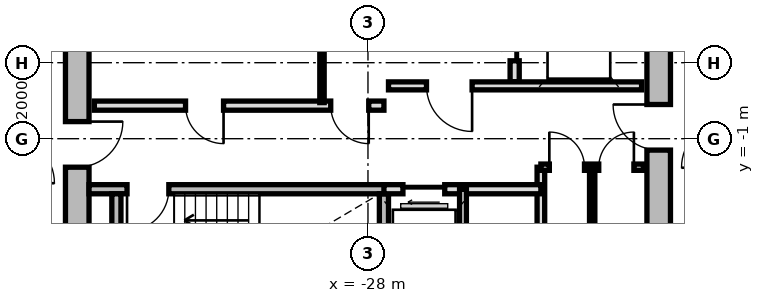
"""IFC4 building model, lengths in metres.
Left out: names, types, materials, properties, quantities, classifications, styles, units other than length and angle.
Written with IfcOpenShell. Run it as: python <this file> out.ifc"""

import sys

from ifc_helpers import new_model, si_unit, direction, frame, frame_2d, origin, place, context, subcontext, project, spatial, rectangle, extrude, source, transform, mapped, element, fill, save


model = new_model("IFC4")
c1 = context("Model", 3, precision=1e-05, world=origin(), true_north=direction((0.0, 1.0)))
c2 = subcontext(c1, "Body", "Model", "MODEL_VIEW")
j1 = project(units=[si_unit("LENGTHUNIT", "METRE"), si_unit("PLANEANGLEUNIT", "RADIAN")], contexts=[c1])
p1 = place(None, origin())
s1 = spatial("IfcSite", under=j1, at=p1, CompositionType="ELEMENT")
p2 = place(p1, origin())
s2 = spatial("IfcBuilding", under=s1, at=p2, CompositionType="ELEMENT")
p3 = place(p2, frame((0.0, 0.0, 143.45)))
s3 = spatial("IfcBuildingStorey", under=s2, at=p3, CompositionType="ELEMENT", Elevation=143.45)
m1 = source(origin(), c2, "Body", "SweptSolid", [
    extrude(rectangle(XDim=11.1, YDim=0.62, at=frame_2d((5.55, 0.0))), origin(), (0.0, 0.0, 1.0), 2.81),
])
p4 = place(p3, frame((-35.65, -5.55, 0.0), z_axis=(0.0, 0.0, 1.0), x_axis=(0.0, 1.0, 0.0)))
e1 = element("IfcWall", 1, at=p4, inside=s3, PredefinedType="SHEAR", context=c2, shape_type="MappedRepresentation", body=[
    mapped(m1, transform((0.0, 0.0, 0.0), x_axis=(1.0, 0.0, 0.0), y_axis=(0.0, 1.0, 0.0), z_axis=(0.0, 0.0, 1.0), scale=1.0)),
])
p5 = place(p4, frame((3.8, 0.0, 0.0)))
e2 = element("IfcOpeningElement", 2, at=p5, cuts=e1, PredefinedType="OPENING", context=c2, shape_type="SweptSolid", body=[
    extrude(rectangle(XDim=1.2, YDim=2.15, at=frame_2d((0.6, 1.075))), frame((0.0, 0.32, 0.0), z_axis=(0.0, -1.0, 0.0), x_axis=(1.0, 0.0, 0.0)), (0.0, 0.0, 1.0), 0.64),
])
p6 = place(p3, frame((-20.35, 5.55, 0.0), z_axis=(0.0, 0.0, 1.0), x_axis=(0.0, -1.0, 0.0)))
e3 = element("IfcWall", 3, at=p6, inside=s3, PredefinedType="SHEAR", context=c2, shape_type="MappedRepresentation", body=[
    mapped(m1, transform((0.0, 0.0, 0.0), x_axis=(1.0, 0.0, 0.0), y_axis=(0.0, 1.0, 0.0), z_axis=(0.0, 0.0, 1.0), scale=1.0)),
])
p7 = place(p6, frame((5.65, 0.0, 0.0)))
e4 = element("IfcOpeningElement", 4, at=p7, cuts=e3, PredefinedType="OPENING", context=c2, shape_type="SweptSolid", body=[
    extrude(rectangle(XDim=1.2, YDim=2.15, at=frame_2d((0.6, 1.075))), frame((0.0, 0.32, 0.0), z_axis=(0.0, -1.0, 0.0), x_axis=(1.0, 0.0, 0.0)), (0.0, 0.0, 1.0), 0.64),
])
m2 = source(origin(), c2, "Body", "SweptSolid", [
    extrude(rectangle(XDim=7.88, YDim=0.24, at=frame_2d((3.94, 0.0))), origin(), (0.0, 0.0, 1.0), 2.81),
])
p8 = place(p3, frame((-35.34, -2.33, 0.0), z_axis=(0.0, 0.0, 1.0), x_axis=(1.0, 0.0, 0.0)))
e5 = element("IfcWall", 5, at=p8, inside=s3, PredefinedType="PARTITIONING", context=c2, shape_type="MappedRepresentation", body=[
    mapped(m2, transform((0.0, 0.0, 0.0), x_axis=(1.0, 0.0, 0.0), y_axis=(0.0, 1.0, 0.0), z_axis=(0.0, 0.0, 1.0), scale=1.0)),
])
p9 = place(p8, frame((1.0, 0.0, 0.0)))
e6 = element("IfcOpeningElement", 6, at=p9, cuts=e5, PredefinedType="OPENING", context=c2, shape_type="SweptSolid", body=[
    extrude(rectangle(XDim=1.1, YDim=2.15, at=frame_2d((0.55, 1.075))), frame((0.0, 0.13, 0.0), z_axis=(0.0, -1.0, 0.0), x_axis=(1.0, 0.0, 0.0)), (0.0, 0.0, 1.0), 0.26),
])
m3 = source(origin(), c2, "Body", "SweptSolid", [
    extrude(rectangle(XDim=3.19, YDim=0.24, at=frame_2d((1.595, 0.0))), origin(), (0.0, 0.0, 1.0), 2.81),
])
for number, where, z_axis, x_axis in (
    (7, (-34.62, -5.64, 0.0), (0.0, 0.0, 1.0), (0.0, 1.0, 0.0)),
    (8, (-27.58, -5.64, 0.0), (0.0, 0.0, 1.0), (0.0, 1.0, 0.0)),
):
    element("IfcWall", number, at=place(p3, frame(where, z_axis=z_axis, x_axis=x_axis)), inside=s3, PredefinedType="PARTITIONING", context=c2, shape_type="MappedRepresentation", body=[
        mapped(m3, transform((0.0, 0.0, 0.0), x_axis=(1.0, 0.0, 0.0), y_axis=(0.0, 1.0, 0.0), z_axis=(0.0, 0.0, 1.0), scale=1.0)),
    ])
m4 = source(origin(), c2, "Body", "SweptSolid", [
    extrude(rectangle(XDim=5.0, YDim=0.24, at=frame_2d((2.5, 0.0))), origin(), (0.0, 0.0, 1.0), 2.795),
])
p10 = place(p3, frame((-24.14, 0.5, 0.0), z_axis=(0.0, 0.0, 1.0), x_axis=(0.0, 1.0, 0.0)))
e9 = element("IfcWall", 9, at=p10, inside=s3, PredefinedType="PARTITIONING", context=c2, shape_type="MappedRepresentation", body=[
    mapped(m4, transform((0.0, 0.0, 0.0), x_axis=(1.0, 0.0, 0.0), y_axis=(0.0, 1.0, 0.0), z_axis=(0.0, 0.0, 1.0), scale=1.0)),
])
p11 = place(p10, frame((3.05, 0.0, 0.0)))
e10 = element("IfcOpeningElement", 10, at=p11, cuts=e9, PredefinedType="OPENING", context=c2, shape_type="SweptSolid", body=[
    extrude(rectangle(XDim=1.3, YDim=2.2, at=frame_2d((0.65, 1.1))), frame((0.0, 0.13, 0.0), z_axis=(0.0, -1.0, 0.0), x_axis=(1.0, 0.0, 0.0)), (0.0, 0.0, 1.0), 0.26),
])
p12 = place(p10, frame((0.55, 0.0, 0.0)))
e11 = element("IfcOpeningElement", 11, at=p12, cuts=e9, PredefinedType="OPENING", context=c2, shape_type="SweptSolid", body=[
    extrude(rectangle(XDim=1.3, YDim=2.2, at=frame_2d((0.65, 1.1))), frame((0.0, 0.13, 0.0), z_axis=(0.0, -1.0, 0.0), x_axis=(1.0, 0.0, 0.0)), (0.0, 0.0, 1.0), 0.26),
])
m5 = source(origin(), c2, "Body", "SweptSolid", [
    extrude(rectangle(XDim=6.66, YDim=0.21, at=frame_2d((3.33, 0.0))), origin(), (0.0, 0.0, 1.0), 2.795),
])
p13 = place(p3, frame((-27.46, 0.39, 0.0), z_axis=(0.0, 0.0, 1.0), x_axis=(1.0, 0.0, 0.0)))
e12 = element("IfcWall", 12, at=p13, inside=s3, PredefinedType="PARTITIONING", context=c2, shape_type="MappedRepresentation", body=[
    mapped(m5, transform((0.0, 0.0, 0.0), x_axis=(1.0, 0.0, 0.0), y_axis=(0.0, 1.0, 0.0), z_axis=(0.0, 0.0, 1.0), scale=1.0)),
])
p14 = place(p13, frame((1.0, 0.0, 0.0)))
e13 = element("IfcOpeningElement", 13, at=p14, cuts=e12, PredefinedType="OPENING", context=c2, shape_type="SweptSolid", body=[
    extrude(rectangle(XDim=1.2, YDim=2.15, at=frame_2d((0.6, 1.075))), frame((0.0, 0.115, 0.0), z_axis=(0.0, -1.0, 0.0), x_axis=(1.0, 0.0, 0.0)), (0.0, 0.0, 1.0), 0.23),
])
m6 = source(origin(), c2, "Body", "SweptSolid", [
    extrude(rectangle(XDim=7.62, YDim=0.24, at=frame_2d((3.81, 0.0))), origin(), (0.0, 0.0, 1.0), 2.795),
])
p15 = place(p3, frame((-35.2, -0.13, 0.0), z_axis=(0.0, 0.0, 1.0), x_axis=(1.0, 0.0, 0.0)))
e14 = element("IfcWall", 14, at=p15, inside=s3, PredefinedType="PARTITIONING", context=c2, shape_type="MappedRepresentation", body=[
    mapped(m6, transform((0.0, 0.0, 0.0), x_axis=(1.0, 0.0, 0.0), y_axis=(0.0, 1.0, 0.0), z_axis=(0.0, 0.0, 1.0), scale=1.0)),
])
p16 = place(p15, frame((6.22, 0.0, 0.0)))
e15 = element("IfcOpeningElement", 15, at=p16, cuts=e14, PredefinedType="OPENING", context=c2, shape_type="SweptSolid", body=[
    extrude(rectangle(XDim=1.0, YDim=2.1, at=frame_2d((0.5, 1.05))), frame((0.0, 0.13, 0.0), z_axis=(0.0, -1.0, 0.0), x_axis=(1.0, 0.0, 0.0)), (0.0, 0.0, 1.0), 0.26),
])
p17 = place(p15, frame((2.4, 0.0, 0.0)))
e16 = element("IfcOpeningElement", 16, at=p17, cuts=e14, PredefinedType="OPENING", context=c2, shape_type="SweptSolid", body=[
    extrude(rectangle(XDim=1.0, YDim=2.1, at=frame_2d((0.5, 1.05))), frame((0.0, 0.13, 0.0), z_axis=(0.0, -1.0, 0.0), x_axis=(1.0, 0.0, 0.0)), (0.0, 0.0, 1.0), 0.26),
])
m7 = source(origin(), c2, "Body", "SweptSolid", [
    extrude(rectangle(XDim=2.33, YDim=0.115, at=frame_2d((1.165, 0.0))), origin(), (0.0, 0.0, 1.0), 2.795),
])
p18 = place(p3, frame((-29.21, -0.05, 0.0), z_axis=(0.0, 0.0, 1.0), x_axis=(0.0, 1.0, 0.0)))
e17 = element("IfcWall", 17, at=p18, inside=s3, PredefinedType="PARTITIONING", context=c2, shape_type="MappedRepresentation", body=[
    mapped(m7, transform((0.0, 0.0, 0.0), x_axis=(1.0, 0.0, 0.0), y_axis=(0.0, 1.0, 0.0), z_axis=(0.0, 0.0, 1.0), scale=1.0)),
])
m8 = source(origin(), c2, "Body", "SweptSolid", [
    extrude(rectangle(XDim=3.8, YDim=0.2, at=frame_2d((1.9, 0.0))), origin(), (0.0, 0.0, 1.0), 2.795),
])
p19 = place(p3, frame((-23.45, -5.55, 0.0), z_axis=(0.0, 0.0, 1.0), x_axis=(0.0, 1.0, 0.0)))
e18 = element("IfcWall", 18, at=p19, inside=s3, PredefinedType="PARTITIONING", context=c2, shape_type="MappedRepresentation", body=[
    mapped(m8, transform((0.0, 0.0, 0.0), x_axis=(1.0, 0.0, 0.0), y_axis=(0.0, 1.0, 0.0), z_axis=(0.0, 0.0, 1.0), scale=1.0)),
])
m9 = source(origin(), c2, "Body", "SweptSolid", [
    extrude(rectangle(XDim=4.13, YDim=0.24, at=frame_2d((2.065, 0.0))), origin(), (0.0, 0.0, 1.0), 2.795),
])
p20 = place(p3, frame((-27.58, -2.33, 0.0), z_axis=(0.0, 0.0, 1.0), x_axis=(1.0, 0.0, 0.0)))
e19 = element("IfcWall", 19, at=p20, inside=s3, PredefinedType="PARTITIONING", context=c2, shape_type="MappedRepresentation", body=[
    mapped(m9, transform((0.0, 0.0, 0.0), x_axis=(1.0, 0.0, 0.0), y_axis=(0.0, 1.0, 0.0), z_axis=(0.0, 0.0, 1.0), scale=1.0)),
])
p21 = place(p20, frame((0.5, 0.0, 0.0)))
e20 = element("IfcOpeningElement", 20, at=p21, cuts=e19, PredefinedType="OPENING", context=c2, shape_type="SweptSolid", body=[
    extrude(rectangle(XDim=1.1, YDim=2.2, at=frame_2d((0.55, 1.1))), frame((0.0, 0.13, 0.0), z_axis=(0.0, -1.0, 0.0), x_axis=(1.0, 0.0, 0.0)), (0.0, 0.0, 1.0), 0.26),
])
m10 = source(origin(), c2, "Body", "SweptSolid", [
    extrude(rectangle(XDim=3.22, YDim=0.18, at=frame_2d((1.61, 0.0))), origin(), (0.0, 0.0, 1.0), 2.795),
])
p22 = place(p3, frame((-25.5, -5.55, 0.0), z_axis=(0.0, 0.0, 1.0), x_axis=(0.0, 1.0, 0.0)))
e21 = element("IfcWall", 21, at=p22, inside=s3, PredefinedType="PARTITIONING", context=c2, shape_type="MappedRepresentation", body=[
    mapped(m10, transform((0.0, 0.0, 0.0), x_axis=(1.0, 0.0, 0.0), y_axis=(0.0, 1.0, 0.0), z_axis=(0.0, 0.0, 1.0), scale=1.0)),
])
m11 = source(origin(), c2, "Body", "SweptSolid", [
    extrude(rectangle(XDim=2.7, YDim=0.165, at=frame_2d((1.35, 0.0))), origin(), (0.0, 0.0, 1.0), 2.795),
])
p23 = place(p3, frame((-23.45, -1.75, 0.0), z_axis=(0.0, 0.0, 1.0), x_axis=(1.0, 0.0, 0.0)))
e22 = element("IfcWall", 22, at=p23, inside=s3, PredefinedType="PARTITIONING", context=c2, shape_type="MappedRepresentation", body=[
    mapped(m11, transform((0.0, 0.0, 0.0), x_axis=(1.0, 0.0, 0.0), y_axis=(0.0, 1.0, 0.0), z_axis=(0.0, 0.0, 1.0), scale=1.0)),
])
p24 = place(p23, frame((0.222, 0.0, 0.0)))
e23 = element("IfcOpeningElement", 23, at=p24, cuts=e22, PredefinedType="OPENING", context=c2, shape_type="SweptSolid", body=[
    extrude(rectangle(XDim=0.925, YDim=2.1, at=frame_2d((0.462, 1.05))), frame((0.0, 0.093, 0.0), z_axis=(0.0, -1.0, 0.0), x_axis=(1.0, 0.0, 0.0)), (0.0, 0.0, 1.0), 0.185),
])
p25 = place(p23, frame((1.522, 0.0, 0.0)))
e24 = element("IfcOpeningElement", 24, at=p25, cuts=e22, PredefinedType="OPENING", context=c2, shape_type="SweptSolid", body=[
    extrude(rectangle(XDim=0.925, YDim=2.1, at=frame_2d((0.462, 1.05))), frame((0.0, 0.093, 0.0), z_axis=(0.0, -1.0, 0.0), x_axis=(1.0, 0.0, 0.0)), (0.0, 0.0, 1.0), 0.185),
])
m12 = source(origin(), c2, "Body", "SweptSolid", [
    extrude(rectangle(XDim=3.8, YDim=0.14, at=frame_2d((1.9, 0.0))), origin(), (0.0, 0.0, 1.0), 2.795),
])
p26 = place(p3, frame((-22.1, -5.55, 0.0), z_axis=(0.0, 0.0, 1.0), x_axis=(0.0, 1.0, 0.0)))
e25 = element("IfcWall", 25, at=p26, inside=s3, PredefinedType="PARTITIONING", context=c2, shape_type="MappedRepresentation", body=[
    mapped(m12, transform((0.0, 0.0, 0.0), x_axis=(1.0, 0.0, 0.0), y_axis=(0.0, 1.0, 0.0), z_axis=(0.0, 0.0, 1.0), scale=1.0)),
])
m13 = source(origin(), c2, "Body", "SweptSolid", [
    extrude(rectangle(XDim=1.1, YDim=2.15, at=frame_2d((0.55, 1.075))), frame((0.0, 0.025, 0.0), z_axis=(0.0, -1.0, 0.0), x_axis=(1.0, 0.0, 0.0)), (0.0, 0.0, 1.0), 0.05),
])
p27 = place(p9, frame((1.1, 0.0, 0.0), z_axis=(0.0, 0.0, 1.0), x_axis=(-1.0, 0.0, 0.0)))
e26 = element("IfcDoor", 26, at=p27, inside=s3, OperationType="SINGLE_SWING_RIGHT", PredefinedType="DOOR", context=c2, shape_type="MappedRepresentation", body=[
    mapped(m13, transform((0.0, 0.0, 0.0), x_axis=(1.0, 0.0, 0.0), y_axis=(0.0, 1.0, 0.0), z_axis=(0.0, 0.0, 1.0), scale=1.0)),
])
fill(e6, e26)
m14 = source(origin(), c2, "Body", "SweptSolid", [
    extrude(rectangle(XDim=1.3, YDim=2.2, at=frame_2d((0.65, 1.1))), frame((0.0, 0.025, 0.0), z_axis=(0.0, -1.0, 0.0), x_axis=(1.0, 0.0, 0.0)), (0.0, 0.0, 1.0), 0.05),
])
p28 = place(p12, origin())
e27 = element("IfcDoor", 27, at=p28, inside=s3, OperationType="SLIDING_TO_RIGHT", PredefinedType="DOOR", context=c2, shape_type="MappedRepresentation", body=[
    mapped(m14, transform((0.0, 0.0, 0.0), x_axis=(1.0, 0.0, 0.0), y_axis=(0.0, 1.0, 0.0), z_axis=(0.0, 0.0, 1.0), scale=1.0)),
])
fill(e11, e27)
m15 = source(origin(), c2, "Body", "SweptSolid", [
    extrude(rectangle(XDim=1.2, YDim=2.15, at=frame_2d((0.6, 1.075))), frame((0.0, 0.025, 0.0), z_axis=(0.0, -1.0, 0.0), x_axis=(1.0, 0.0, 0.0)), (0.0, 0.0, 1.0), 0.05),
])
p29 = place(p14, frame((1.2, 0.0, 0.0), z_axis=(0.0, 0.0, 1.0), x_axis=(-1.0, 0.0, 0.0)))
e28 = element("IfcDoor", 28, at=p29, inside=s3, OperationType="SINGLE_SWING_LEFT", PredefinedType="DOOR", context=c2, shape_type="MappedRepresentation", body=[
    mapped(m15, transform((0.0, 0.0, 0.0), x_axis=(1.0, 0.0, 0.0), y_axis=(0.0, 1.0, 0.0), z_axis=(0.0, 0.0, 1.0), scale=1.0)),
])
fill(e13, e28)
p30 = place(p5, frame((1.2, 0.0, 0.0), z_axis=(0.0, 0.0, 1.0), x_axis=(-1.0, 0.0, 0.0)))
e29 = element("IfcDoor", 29, at=p30, inside=s3, OperationType="SINGLE_SWING_LEFT", PredefinedType="DOOR", context=c2, shape_type="MappedRepresentation", body=[
    mapped(m15, transform((0.0, 0.0, 0.0), x_axis=(1.0, 0.0, 0.0), y_axis=(0.0, 1.0, 0.0), z_axis=(0.0, 0.0, 1.0), scale=1.0)),
])
fill(e2, e29)
p31 = place(p7, frame((1.2, 0.0, 0.0), z_axis=(0.0, 0.0, 1.0), x_axis=(-1.0, 0.0, 0.0)))
e30 = element("IfcDoor", 30, at=p31, inside=s3, OperationType="SINGLE_SWING_RIGHT", PredefinedType="DOOR", context=c2, shape_type="MappedRepresentation", body=[
    mapped(m15, transform((0.0, 0.0, 0.0), x_axis=(1.0, 0.0, 0.0), y_axis=(0.0, 1.0, 0.0), z_axis=(0.0, 0.0, 1.0), scale=1.0)),
])
fill(e4, e30)
m16 = source(origin(), c2, "Body", "SweptSolid", [
    extrude(rectangle(XDim=1.0, YDim=2.1, at=frame_2d((0.5, 1.05))), frame((0.0, 0.025, 0.0), z_axis=(0.0, -1.0, 0.0), x_axis=(1.0, 0.0, 0.0)), (0.0, 0.0, 1.0), 0.05),
])
p32 = place(p16, frame((1.0, 0.0, 0.0), z_axis=(0.0, 0.0, 1.0), x_axis=(-1.0, 0.0, 0.0)))
e31 = element("IfcDoor", 31, at=p32, inside=s3, OperationType="SINGLE_SWING_LEFT", PredefinedType="DOOR", context=c2, shape_type="MappedRepresentation", body=[
    mapped(m16, transform((0.0, 0.0, 0.0), x_axis=(1.0, 0.0, 0.0), y_axis=(0.0, 1.0, 0.0), z_axis=(0.0, 0.0, 1.0), scale=1.0)),
])
fill(e15, e31)
p33 = place(p17, frame((1.0, 0.0, 0.0), z_axis=(0.0, 0.0, 1.0), x_axis=(-1.0, 0.0, 0.0)))
e32 = element("IfcDoor", 32, at=p33, inside=s3, OperationType="SINGLE_SWING_LEFT", PredefinedType="DOOR", context=c2, shape_type="MappedRepresentation", body=[
    mapped(m16, transform((0.0, 0.0, 0.0), x_axis=(1.0, 0.0, 0.0), y_axis=(0.0, 1.0, 0.0), z_axis=(0.0, 0.0, 1.0), scale=1.0)),
])
fill(e16, e32)
m17 = source(origin(), c2, "Body", "SweptSolid", [
    extrude(rectangle(XDim=1.1, YDim=2.2, at=frame_2d((0.55, 1.1))), frame((0.0, 0.025, 0.0), z_axis=(0.0, -1.0, 0.0), x_axis=(1.0, 0.0, 0.0)), (0.0, 0.0, 1.0), 0.05),
])
p34 = place(p21, frame((1.1, 0.0, 0.0), z_axis=(0.0, 0.0, 1.0), x_axis=(-1.0, 0.0, 0.0)))
e33 = element("IfcDoor", 33, at=p34, inside=s3, OperationType="SLIDING_TO_LEFT", PredefinedType="DOOR", context=c2, shape_type="MappedRepresentation", body=[
    mapped(m17, transform((0.0, 0.0, 0.0), x_axis=(1.0, 0.0, 0.0), y_axis=(0.0, 1.0, 0.0), z_axis=(0.0, 0.0, 1.0), scale=1.0)),
])
fill(e20, e33)
m18 = source(origin(), c2, "Body", "SweptSolid", [
    extrude(rectangle(XDim=0.925, YDim=2.1, at=frame_2d((0.462, 1.05))), frame((0.0, 0.025, 0.0), z_axis=(0.0, -1.0, 0.0), x_axis=(1.0, 0.0, 0.0)), (0.0, 0.0, 1.0), 0.05),
])
p35 = place(p24, origin())
e34 = element("IfcDoor", 34, at=p35, inside=s3, OperationType="SINGLE_SWING_LEFT", PredefinedType="DOOR", context=c2, shape_type="MappedRepresentation", body=[
    mapped(m18, transform((0.0, 0.0, 0.0), x_axis=(1.0, 0.0, 0.0), y_axis=(0.0, 1.0, 0.0), z_axis=(0.0, 0.0, 1.0), scale=1.0)),
])
fill(e23, e34)
p36 = place(p25, origin())
e35 = element("IfcDoor", 35, at=p36, inside=s3, OperationType="SINGLE_SWING_RIGHT", PredefinedType="DOOR", context=c2, shape_type="MappedRepresentation", body=[
    mapped(m18, transform((0.0, 0.0, 0.0), x_axis=(1.0, 0.0, 0.0), y_axis=(0.0, 1.0, 0.0), z_axis=(0.0, 0.0, 1.0), scale=1.0)),
])
fill(e24, e35)
save(model, sys.argv[1])
